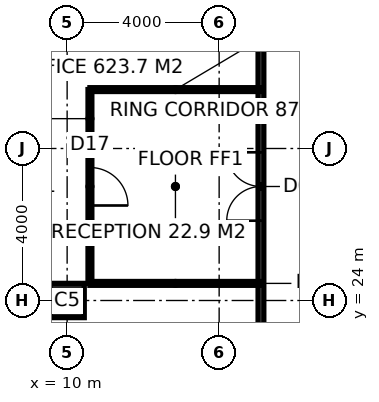
"""IFC4 building model, lengths in metres.
Left out: names, types, materials, properties, quantities, classifications, styles, units other than length and angle.
Written with IfcOpenShell. Run it as: python <this file> out.ifc"""

import sys

from ifc_helpers import new_model, si_unit, direction, frame, frame_2d, origin, origin_2d, place, context, subcontext, project, spatial, rectangle, hollow_rectangle, extrude, element, fill, save


model = new_model("IFC4")
c1 = context("Model", 3, precision=1e-05, world=origin(), true_north=direction((0.0, 1.0)))
c2 = subcontext(c1, "Body", "Model", "MODEL_VIEW")
j1 = project(units=[si_unit("LENGTHUNIT", "METRE"), si_unit("PLANEANGLEUNIT", "RADIAN")], contexts=[c1])
p1 = place(None, origin())
s1 = spatial("IfcSite", under=j1, at=p1, CompositionType="ELEMENT")
p2 = place(p1, origin())
s2 = spatial("IfcBuilding", under=s1, at=p2, CompositionType="ELEMENT")
p3 = place(p2, frame((0.0, 0.0, 147.8)))
s3 = spatial("IfcBuildingStorey", under=s2, at=p3, CompositionType="ELEMENT", Elevation=147.8)
p4 = place(p3, frame((10.0, 24.0, 0.0), z_axis=(0.0, 0.0, 1.0), x_axis=(1.0, 0.0, 0.0)))
e1 = element("IfcColumn", 1, at=p4, inside=s3, PredefinedType="COLUMN", context=c2, shape_type="SweptSolid", body=[
    extrude(hollow_rectangle(XDim=0.9, YDim=0.9, WallThickness=0.1, at=origin_2d()), origin(), (0.0, 0.0, 1.0), 4.0),
])
p5 = place(p3, frame((15.1, 15.625, 0.0), z_axis=(0.0, 0.0, 1.0), x_axis=(0.0, 1.0, 0.0)))
e2 = element("IfcWall", 2, at=p5, inside=s3, PredefinedType="PARTITIONING", context=c2, shape_type="SweptSolid", body=[
    extrude(rectangle(XDim=22.75, YDim=0.15, at=frame_2d((11.375, 0.0))), origin(), (0.0, 0.0, 1.0), 3.85),
])
p6 = place(p5, frame((10.475, 0.0, 0.0)))
e3 = element("IfcOpeningElement", 3, at=p6, cuts=e2, PredefinedType="OPENING", context=c2, shape_type="SweptSolid", body=[
    extrude(rectangle(XDim=1.8, YDim=2.4, at=frame_2d((0.9, 1.2))), frame((0.0, 0.085, 0.0), z_axis=(0.0, -1.0, 0.0), x_axis=(1.0, 0.0, 0.0)), (0.0, 0.0, 1.0), 0.17),
])
p7 = place(p3, frame((15.1, 29.55, 0.0), z_axis=(0.0, 0.0, 1.0), x_axis=(-1.0, 0.0, 0.0)))
e4 = element("IfcWall", 4, at=p7, inside=s3, PredefinedType="PARTITIONING", context=c2, shape_type="SweptSolid", body=[
    extrude(rectangle(XDim=4.5, YDim=0.1, at=frame_2d((2.25, 0.0))), origin(), (0.0, 0.0, 1.0), 3.85),
])
p8 = place(p3, frame((10.6, 29.55, 0.0), z_axis=(0.0, 0.0, 1.0), x_axis=(0.0, -1.0, 0.0)))
e5 = element("IfcWall", 5, at=p8, inside=s3, PredefinedType="PARTITIONING", context=c2, shape_type="SweptSolid", body=[
    extrude(rectangle(XDim=5.1, YDim=0.1, at=frame_2d((2.55, 0.0))), origin(), (0.0, 0.0, 1.0), 3.85),
])
p9 = place(p8, frame((2.05, 0.0, 0.0)))
e6 = element("IfcOpeningElement", 6, at=p9, cuts=e5, PredefinedType="OPENING", context=c2, shape_type="SweptSolid", body=[
    extrude(rectangle(XDim=1.0, YDim=2.2, at=frame_2d((0.5, 1.1))), frame((0.0, 0.06, 0.0), z_axis=(0.0, -1.0, 0.0), x_axis=(1.0, 0.0, 0.0)), (0.0, 0.0, 1.0), 0.12),
])
p10 = place(p3, frame((10.6, 24.45, 0.0), z_axis=(0.0, 0.0, 1.0), x_axis=(1.0, 0.0, 0.0)))
e7 = element("IfcWall", 7, at=p10, inside=s3, PredefinedType="PARTITIONING", context=c2, shape_type="SweptSolid", body=[
    extrude(rectangle(XDim=4.5, YDim=0.1, at=frame_2d((2.25, 0.0))), origin(), (0.0, 0.0, 1.0), 2.95),
])
p11 = place(p6, origin())
e8 = element("IfcDoor", 8, at=p11, inside=s3, OperationType="DOUBLE_DOOR_DOUBLE_SWING", PredefinedType="DOOR", context=c2, shape_type="SweptSolid", body=[
    extrude(rectangle(XDim=1.8, YDim=2.4, at=frame_2d((0.9, 1.2))), frame((0.0, 0.025, 0.0), z_axis=(0.0, -1.0, 0.0), x_axis=(1.0, 0.0, 0.0)), (0.0, 0.0, 1.0), 0.05),
])
fill(e3, e8)
p12 = place(p9, origin())
e9 = element("IfcDoor", 9, at=p12, inside=s3, OperationType="SINGLE_SWING_RIGHT", PredefinedType="DOOR", context=c2, shape_type="SweptSolid", body=[
    extrude(rectangle(XDim=1.0, YDim=2.2, at=frame_2d((0.5, 1.1))), frame((0.0, 0.025, 0.0), z_axis=(0.0, -1.0, 0.0), x_axis=(1.0, 0.0, 0.0)), (0.0, 0.0, 1.0), 0.05),
])
fill(e6, e9)
save(model, sys.argv[1])
